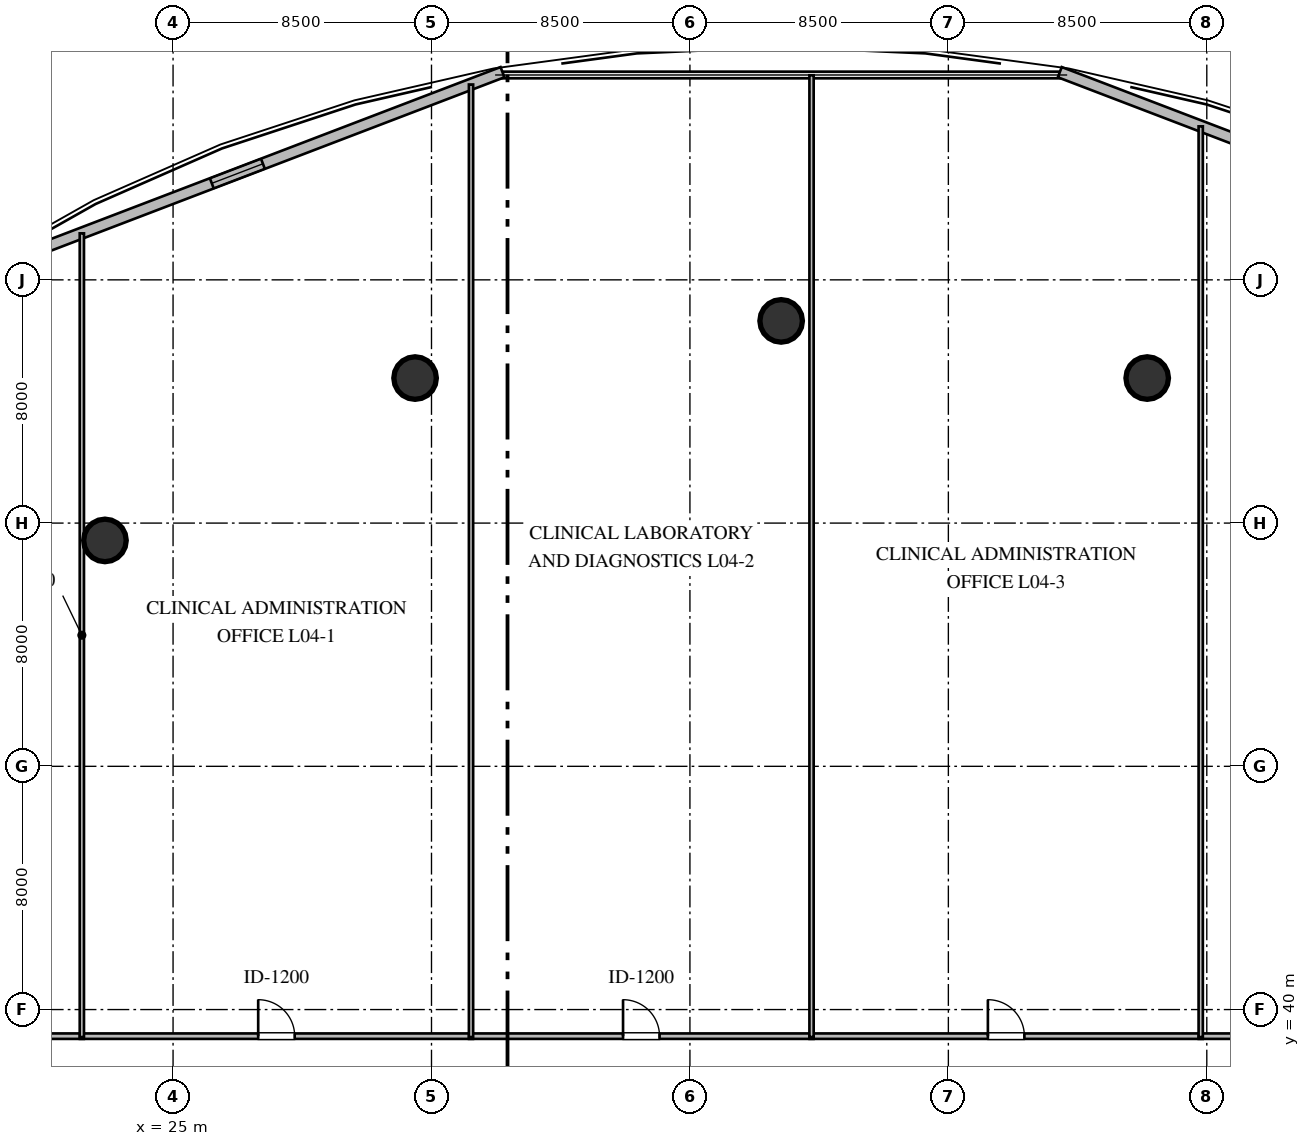
"""IFC4 building model, lengths in metres.
Left out: names, types, materials, properties, quantities, classifications, styles, units other than length and angle.
Written with IfcOpenShell. Run it as: python <this file> out.ifc"""

import sys

from ifc_helpers import new_model, si_unit, direction, frame, frame_2d, origin, origin_2d, place, context, subcontext, project, spatial, rectangle, circle, extrude, element, fill, save


model = new_model("IFC4")
c1 = context("Model", 3, precision=1e-05, world=origin(), true_north=direction((0.0, 1.0)))
c2 = subcontext(c1, "Body", "Model", "MODEL_VIEW")
j1 = project(units=[si_unit("LENGTHUNIT", "METRE"), si_unit("PLANEANGLEUNIT", "RADIAN")], contexts=[c1])
p1 = place(None, origin())
s1 = spatial("IfcSite", under=j1, at=p1, CompositionType="ELEMENT")
p2 = place(p1, origin())
s2 = spatial("IfcBuilding", under=s1, at=p2, CompositionType="ELEMENT")
p3 = place(p2, frame((0.0, 0.0, 19.2)))
s3 = spatial("IfcBuildingStorey", under=s2, at=p3, CompositionType="ELEMENT", Elevation=19.2)
for number, where, z_axis, x_axis in (
    (1, (57.04, 60.77, 0.0), (0.0, 0.0, 1.0), (1.0, 0.0, 0.0)),
    (2, (45.0, 62.65, 0.0), (0.0, 0.0, 1.0), (1.0, 0.0, 0.0)),
    (3, (32.96, 60.77, 0.0), (0.0, 0.0, 1.0), (1.0, 0.0, 0.0)),
    (4, (22.76, 55.43, 0.0), (0.0, 0.0, 1.0), (1.0, 0.0, 0.0)),
):
    element("IfcColumn", number, at=place(p3, frame(where, z_axis=z_axis, x_axis=x_axis)), inside=s3, PredefinedType="COLUMN", context=c2, shape_type="SweptSolid", body=[
        extrude(circle(Radius=0.7, at=origin_2d()), origin(), (0.0, 0.0, 1.0), 4.8),
    ])
p4 = place(p3, frame((71.604, 64.161, 0.0), z_axis=(0.0, 0.0, 1.0), x_axis=(-0.934010262022, 0.357246176238, 0.0)))
e5 = element("IfcWall", 5, at=p4, inside=s3, PredefinedType="STANDARD", context=c2, shape_type="SweptSolid", body=[
    extrude(rectangle(XDim=18.671, YDim=0.36, at=frame_2d((9.335, 0.0))), origin(), (0.0, 0.0, 1.0), 4.56),
])
p5 = place(p4, frame((8.436, 0.0, 1.05)))
e6 = element("IfcOpeningElement", 6, at=p5, cuts=e5, PredefinedType="OPENING", context=c2, shape_type="SweptSolid", body=[
    extrude(rectangle(XDim=1.8, YDim=1.7, at=frame_2d((0.9, 0.85))), frame((0.0, 0.19, 0.0), z_axis=(0.0, -1.0, 0.0), x_axis=(1.0, 0.0, 0.0)), (0.0, 0.0, 1.0), 0.38),
])
p6 = place(p3, frame((35.835, 70.831, 0.0), z_axis=(0.0, 0.0, 1.0), x_axis=(-0.934010262022, -0.357246176238, 0.0)))
e7 = element("IfcWall", 7, at=p6, inside=s3, PredefinedType="STANDARD", context=c2, shape_type="SweptSolid", body=[
    extrude(rectangle(XDim=18.671, YDim=0.36, at=frame_2d((9.335, 0.0))), origin(), (0.0, 0.0, 1.0), 4.56),
])
p7 = place(p6, frame((8.436, 0.0, 1.05)))
e8 = element("IfcOpeningElement", 8, at=p7, cuts=e7, PredefinedType="OPENING", context=c2, shape_type="SweptSolid", body=[
    extrude(rectangle(XDim=1.8, YDim=1.7, at=frame_2d((0.9, 0.85))), frame((0.0, 0.19, 0.0), z_axis=(0.0, -1.0, 0.0), x_axis=(1.0, 0.0, 0.0)), (0.0, 0.0, 1.0), 0.38),
])
p8 = place(p3, frame((13.97, 39.125, 0.0), z_axis=(0.0, 0.0, 1.0), x_axis=(1.0, 0.0, 0.0)))
e9 = element("IfcWall", 9, at=p8, inside=s3, PredefinedType="PARTITIONING", context=c2, shape_type="SweptSolid", body=[
    extrude(rectangle(XDim=8.095, YDim=0.18, at=frame_2d((4.047, 0.0))), origin(), (0.0, 0.0, 1.0), 4.56),
])
p9 = place(p8, frame((3.448, 0.0, 0.0)))
e10 = element("IfcOpeningElement", 10, at=p9, cuts=e9, PredefinedType="OPENING", context=c2, shape_type="SweptSolid", body=[
    extrude(rectangle(XDim=1.2, YDim=2.15, at=frame_2d((0.6, 1.075))), frame((0.0, 0.1, 0.0), z_axis=(0.0, -1.0, 0.0), x_axis=(1.0, 0.0, 0.0)), (0.0, 0.0, 1.0), 0.2),
])
p10 = place(p3, frame((21.935, 39.125, 0.0), z_axis=(0.0, 0.0, 1.0), x_axis=(1.0, 0.0, 0.0)))
e11 = element("IfcWall", 11, at=p10, inside=s3, PredefinedType="PARTITIONING", context=c2, shape_type="SweptSolid", body=[
    extrude(rectangle(XDim=12.93, YDim=0.18, at=frame_2d((6.465, 0.0))), origin(), (0.0, 0.0, 1.0), 4.56),
])
p11 = place(p10, frame((5.865, 0.0, 0.0)))
e12 = element("IfcOpeningElement", 12, at=p11, cuts=e11, PredefinedType="OPENING", context=c2, shape_type="SweptSolid", body=[
    extrude(rectangle(XDim=1.2, YDim=2.15, at=frame_2d((0.6, 1.075))), frame((0.0, 0.1, 0.0), z_axis=(0.0, -1.0, 0.0), x_axis=(1.0, 0.0, 0.0)), (0.0, 0.0, 1.0), 0.2),
])
p12 = place(p3, frame((34.735, 39.125, 0.0), z_axis=(0.0, 0.0, 1.0), x_axis=(1.0, 0.0, 0.0)))
e13 = element("IfcWall", 13, at=p12, inside=s3, PredefinedType="PARTITIONING", context=c2, shape_type="SweptSolid", body=[
    extrude(rectangle(XDim=11.33, YDim=0.18, at=frame_2d((5.665, 0.0))), origin(), (0.0, 0.0, 1.0), 4.56),
])
p13 = place(p12, frame((5.065, 0.0, 0.0)))
e14 = element("IfcOpeningElement", 14, at=p13, cuts=e13, PredefinedType="OPENING", context=c2, shape_type="SweptSolid", body=[
    extrude(rectangle(XDim=1.2, YDim=2.15, at=frame_2d((0.6, 1.075))), frame((0.0, 0.1, 0.0), z_axis=(0.0, -1.0, 0.0), x_axis=(1.0, 0.0, 0.0)), (0.0, 0.0, 1.0), 0.2),
])
p14 = place(p3, frame((45.935, 39.125, 0.0), z_axis=(0.0, 0.0, 1.0), x_axis=(1.0, 0.0, 0.0)))
e15 = element("IfcWall", 15, at=p14, inside=s3, PredefinedType="PARTITIONING", context=c2, shape_type="SweptSolid", body=[
    extrude(rectangle(XDim=12.93, YDim=0.18, at=frame_2d((6.465, 0.0))), origin(), (0.0, 0.0, 1.0), 4.56),
])
p15 = place(p14, frame((5.865, 0.0, 0.0)))
e16 = element("IfcOpeningElement", 16, at=p15, cuts=e15, PredefinedType="OPENING", context=c2, shape_type="SweptSolid", body=[
    extrude(rectangle(XDim=1.2, YDim=2.15, at=frame_2d((0.6, 1.075))), frame((0.0, 0.1, 0.0), z_axis=(0.0, -1.0, 0.0), x_axis=(1.0, 0.0, 0.0)), (0.0, 0.0, 1.0), 0.2),
])
p16 = place(p3, frame((58.735, 39.125, 0.0), z_axis=(0.0, 0.0, 1.0), x_axis=(1.0, 0.0, 0.0)))
e17 = element("IfcWall", 17, at=p16, inside=s3, PredefinedType="PARTITIONING", context=c2, shape_type="SweptSolid", body=[
    extrude(rectangle(XDim=11.33, YDim=0.18, at=frame_2d((5.665, 0.0))), origin(), (0.0, 0.0, 1.0), 4.56),
])
p17 = place(p16, frame((5.065, 0.0, 0.0)))
e18 = element("IfcOpeningElement", 18, at=p17, cuts=e17, PredefinedType="OPENING", context=c2, shape_type="SweptSolid", body=[
    extrude(rectangle(XDim=1.2, YDim=2.15, at=frame_2d((0.6, 1.075))), frame((0.0, 0.1, 0.0), z_axis=(0.0, -1.0, 0.0), x_axis=(1.0, 0.0, 0.0)), (0.0, 0.0, 1.0), 0.2),
])
p18 = place(p3, frame((22.0, 65.529, 0.0), z_axis=(0.0, 0.0, 1.0), x_axis=(0.0, -1.0, 0.0)))
e19 = element("IfcWall", 19, at=p18, inside=s3, PredefinedType="PARTITIONING", context=c2, shape_type="SweptSolid", body=[
    extrude(rectangle(XDim=26.434, YDim=0.14, at=frame_2d((13.217, 0.0))), origin(), (0.0, 0.0, 1.0), 4.006),
])
p19 = place(p3, frame((34.8, 70.425, 0.0), z_axis=(0.0, 0.0, 1.0), x_axis=(0.0, -1.0, 0.0)))
e20 = element("IfcWall", 20, at=p19, inside=s3, PredefinedType="PARTITIONING", context=c2, shape_type="SweptSolid", body=[
    extrude(rectangle(XDim=31.33, YDim=0.14, at=frame_2d((15.665, 0.0))), origin(), (0.0, 0.0, 1.0), 4.56),
])
p20 = place(p3, frame((46.0, 70.728, 0.0), z_axis=(0.0, 0.0, 1.0), x_axis=(0.0, -1.0, 0.0)))
e21 = element("IfcWall", 21, at=p20, inside=s3, PredefinedType="PARTITIONING", context=c2, shape_type="SweptSolid", body=[
    extrude(rectangle(XDim=31.633, YDim=0.14, at=frame_2d((15.816, 0.0))), origin(), (0.0, 0.0, 1.0), 4.56),
])
p21 = place(p3, frame((58.8, 69.048, 0.0), z_axis=(0.0, 0.0, 1.0), x_axis=(0.0, -1.0, 0.0)))
e22 = element("IfcWall", 22, at=p21, inside=s3, PredefinedType="PARTITIONING", context=c2, shape_type="SweptSolid", body=[
    extrude(rectangle(XDim=29.953, YDim=0.14, at=frame_2d((14.977, 0.0))), origin(), (0.0, 0.0, 1.0), 4.56),
])
p22 = place(p7, origin())
e23 = element("IfcWindow", 23, at=p22, inside=s3, PartitioningType="SINGLE_PANEL", PredefinedType="WINDOW", context=c2, shape_type="SweptSolid", body=[
    extrude(rectangle(XDim=1.8, YDim=1.7, at=frame_2d((0.9, 0.85))), frame((0.0, 0.03, 0.0), z_axis=(0.0, -1.0, 0.0), x_axis=(1.0, 0.0, 0.0)), (0.0, 0.0, 1.0), 0.06),
])
fill(e8, e23)
p23 = place(p11, origin())
e24 = element("IfcDoor", 24, at=p23, inside=s3, OperationType="SINGLE_SWING_LEFT", PredefinedType="DOOR", context=c2, shape_type="SweptSolid", body=[
    extrude(rectangle(XDim=1.2, YDim=2.15, at=frame_2d((0.6, 1.075))), frame((0.0, 0.025, 0.0), z_axis=(0.0, -1.0, 0.0), x_axis=(1.0, 0.0, 0.0)), (0.0, 0.0, 1.0), 0.05),
])
fill(e12, e24)
p24 = place(p13, origin())
e25 = element("IfcDoor", 25, at=p24, inside=s3, OperationType="SINGLE_SWING_LEFT", PredefinedType="DOOR", context=c2, shape_type="SweptSolid", body=[
    extrude(rectangle(XDim=1.2, YDim=2.15, at=frame_2d((0.6, 1.075))), frame((0.0, 0.025, 0.0), z_axis=(0.0, -1.0, 0.0), x_axis=(1.0, 0.0, 0.0)), (0.0, 0.0, 1.0), 0.05),
])
fill(e14, e25)
p25 = place(p15, origin())
e26 = element("IfcDoor", 26, at=p25, inside=s3, OperationType="SINGLE_SWING_LEFT", PredefinedType="DOOR", context=c2, shape_type="SweptSolid", body=[
    extrude(rectangle(XDim=1.2, YDim=2.15, at=frame_2d((0.6, 1.075))), frame((0.0, 0.025, 0.0), z_axis=(0.0, -1.0, 0.0), x_axis=(1.0, 0.0, 0.0)), (0.0, 0.0, 1.0), 0.05),
])
fill(e16, e26)
save(model, sys.argv[1])
